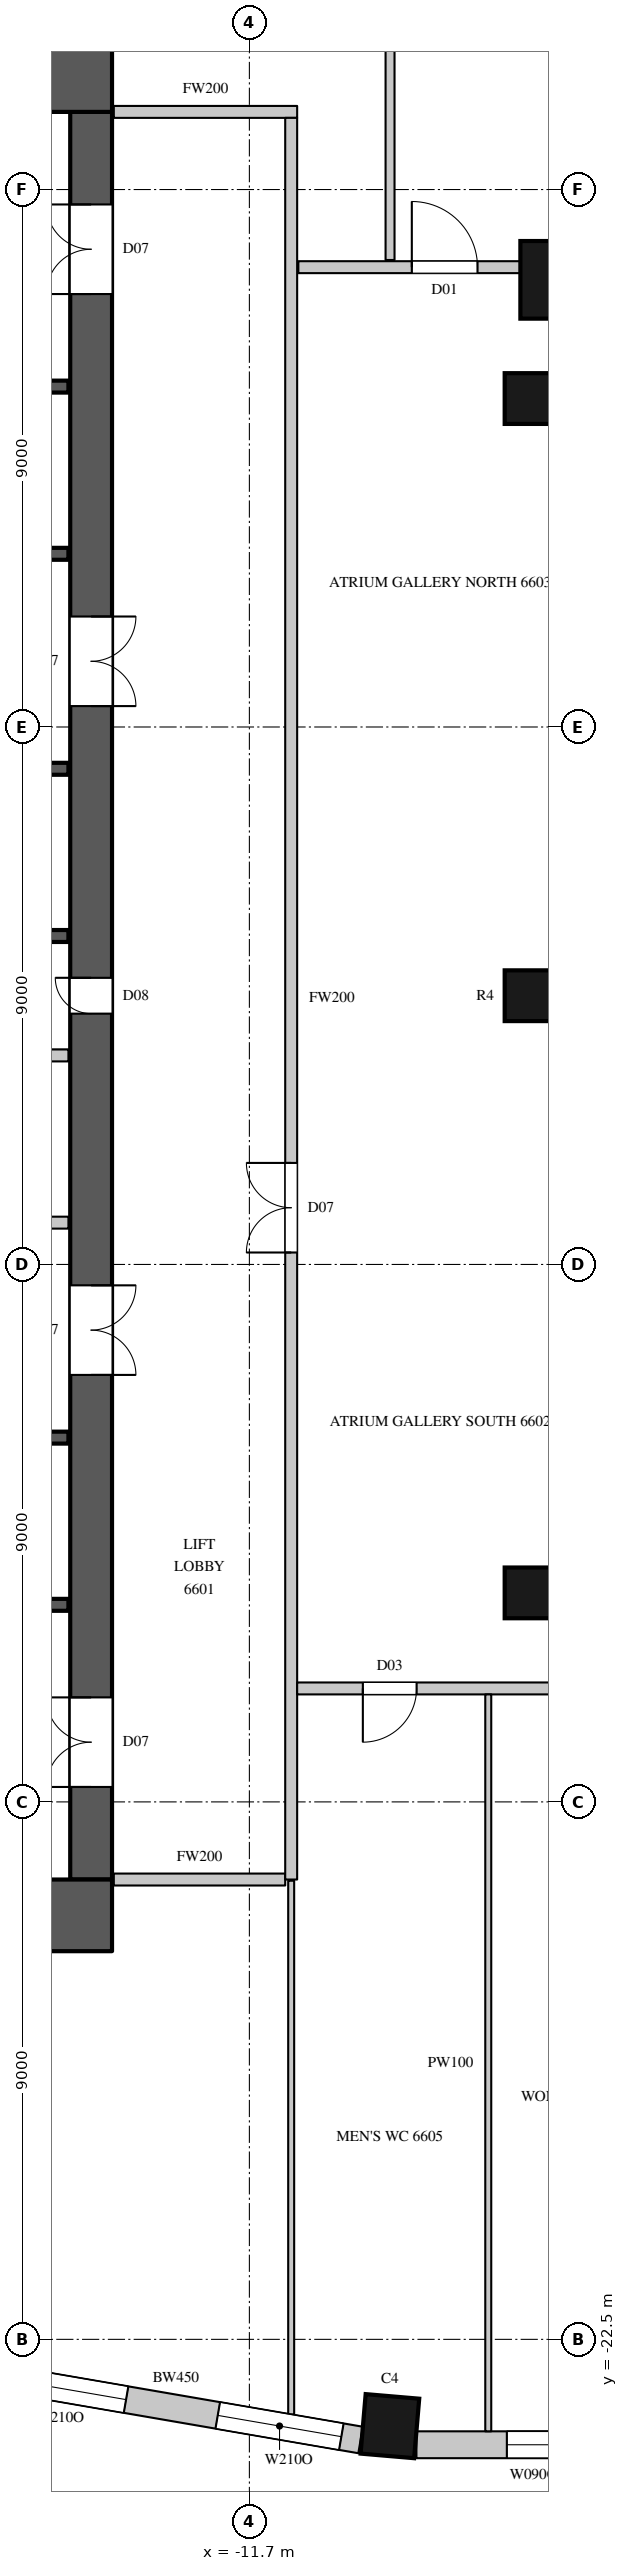
"""IFC4 building model, lengths in metres.
Left out: names, types, materials, properties, quantities, classifications, styles, units other than length and angle.
Written with IfcOpenShell. Run it as: python <this file> out.ifc"""

import sys

from ifc_helpers import new_model, si_unit, direction, frame, frame_2d, origin, origin_2d, place, context, subcontext, project, spatial, rectangle, circle, extrude, element, fill, save


model = new_model("IFC4")
c1 = context("Model", 3, precision=1e-05, world=origin(), true_north=direction((0.0, 1.0)))
c2 = subcontext(c1, "Body", "Model", "MODEL_VIEW")
j1 = project(units=[si_unit("LENGTHUNIT", "METRE"), si_unit("PLANEANGLEUNIT", "RADIAN")], contexts=[c1])
p1 = place(None, origin())
s1 = spatial("IfcSite", under=j1, at=p1, CompositionType="ELEMENT")
p2 = place(p1, origin())
s2 = spatial("IfcBuilding", under=s1, at=p2, CompositionType="ELEMENT")
p3 = place(p2, frame((0.0, 0.0, 292.6)))
s3 = spatial("IfcBuildingStorey", under=s2, at=p3, CompositionType="ELEMENT", Elevation=292.6)
p4 = place(p3, frame((-6.512, 11.988, 0.0), z_axis=(0.0, 0.0, 1.0), x_axis=(1.0, 0.0, 0.0)))
e1 = element("IfcColumn", 1, at=p4, inside=s3, PredefinedType="COLUMN", context=c2, shape_type="SweptSolid", body=[
    extrude(circle(Radius=0.65, at=origin_2d()), origin(), (0.0, 0.0, 1.0), 4.1),
])
p5 = place(p3, frame((-9.347, -23.954, 0.0), z_axis=(0.0, 0.0, 1.0), x_axis=(0.996368206733, -0.085149260784, 0.0)))
e2 = element("IfcColumn", 2, at=p5, inside=s3, PredefinedType="COLUMN", context=c2, shape_type="SweptSolid", body=[
    extrude(rectangle(XDim=0.9, YDim=1.0, at=origin_2d()), origin(), (0.0, 0.0, 1.0), 4.1),
])
for number, where, z_axis, x_axis in (
    (3, (-7.0, -10.0, 0.0), (0.0, 0.0, 1.0), (1.0, 0.0, 0.0)),
    (4, (-7.0, 0.0, 0.0), (0.0, 0.0, 1.0), (1.0, 0.0, 0.0)),
    (5, (-7.0, 10.0, 0.0), (0.0, 0.0, 1.0), (1.0, 0.0, 0.0)),
):
    element("IfcColumn", number, at=place(p3, frame(where, z_axis=z_axis, x_axis=x_axis)), inside=s3, PredefinedType="COLUMN", context=c2, shape_type="SweptSolid", body=[
        extrude(circle(Radius=0.425, at=origin_2d()), origin(), (0.0, 0.0, 1.0), 4.1),
    ])
p6 = place(p3, frame((-16.157, -23.097, 0.0), z_axis=(0.0, 0.0, 1.0), x_axis=(0.985502073964, -0.169663379113, 0.0)))
e6 = element("IfcWall", 6, at=p6, inside=s3, PredefinedType="SOLIDWALL", context=c2, shape_type="SweptSolid", body=[
    extrude(rectangle(XDim=6.412, YDim=0.45, at=frame_2d((3.206, 0.0))), origin(), (0.0, 0.0, 1.0), 3.8),
])
p7 = place(p6, frame((0.327, 0.0, 1.05)))
e7 = element("IfcOpeningElement", 7, at=p7, cuts=e6, PredefinedType="OPENING", context=c2, shape_type="SweptSolid", body=[
    extrude(rectangle(XDim=2.1, YDim=2.4, at=frame_2d((1.05, 1.2))), frame((0.0, 0.235, 0.0), z_axis=(0.0, -1.0, 0.0), x_axis=(1.0, 0.0, 0.0)), (0.0, 0.0, 1.0), 0.47),
])
p8 = place(p6, frame((3.985, 0.0, 1.05)))
e8 = element("IfcOpeningElement", 8, at=p8, cuts=e6, PredefinedType="OPENING", context=c2, shape_type="SweptSolid", body=[
    extrude(rectangle(XDim=2.1, YDim=2.4, at=frame_2d((1.05, 1.2))), frame((0.0, 0.235, 0.0), z_axis=(0.0, -1.0, 0.0), x_axis=(1.0, 0.0, 0.0)), (0.0, 0.0, 1.0), 0.47),
])
p9 = place(p3, frame((-8.903, -24.265, 0.0), z_axis=(0.0, 0.0, 1.0), x_axis=(1.0, 0.0, 0.0)))
e9 = element("IfcWall", 9, at=p9, inside=s3, PredefinedType="SOLIDWALL", context=c2, shape_type="SweptSolid", body=[
    extrude(rectangle(XDim=6.406, YDim=0.45, at=frame_2d((3.203, 0.0))), origin(), (0.0, 0.0, 1.0), 3.8),
])
p10 = place(p9, frame((1.514, 0.0, 1.05)))
e10 = element("IfcOpeningElement", 10, at=p10, cuts=e9, PredefinedType="OPENING", context=c2, shape_type="SweptSolid", body=[
    extrude(rectangle(XDim=0.9, YDim=2.4, at=frame_2d((0.45, 1.2))), frame((0.0, 0.235, 0.0), z_axis=(0.0, -1.0, 0.0), x_axis=(1.0, 0.0, 0.0)), (0.0, 0.0, 1.0), 0.47),
])
p11 = place(p9, frame((4.841, 0.0, 1.05)))
e11 = element("IfcOpeningElement", 11, at=p11, cuts=e9, PredefinedType="OPENING", context=c2, shape_type="SweptSolid", body=[
    extrude(rectangle(XDim=1.2, YDim=2.4, at=frame_2d((0.6, 1.2))), frame((0.0, 0.235, 0.0), z_axis=(0.0, -1.0, 0.0), x_axis=(1.0, 0.0, 0.0)), (0.0, 0.0, 1.0), 0.47),
])
for number, where, z_axis, x_axis in (
    (12, (-30.0, 15.4, 0.0), (0.0, 0.0, 1.0), (1.0, 0.0, 0.0)),
    (13, (-30.0, -15.4, 0.0), (0.0, 0.0, 1.0), (1.0, 0.0, 0.0)),
):
    element("IfcWall", number, at=place(p3, frame(where, z_axis=z_axis, x_axis=x_axis)), inside=s3, PredefinedType="SHEAR", context=c2, shape_type="SweptSolid", body=[
        extrude(rectangle(XDim=16.0, YDim=1.2, at=frame_2d((8.0, 0.0))), origin(), (0.0, 0.0, 1.0), 4.1),
    ])
p12 = place(p3, frame((-14.35, -14.8, 0.0), z_axis=(0.0, 0.0, 1.0), x_axis=(0.0, 1.0, 0.0)))
e14 = element("IfcWall", 14, at=p12, inside=s3, PredefinedType="SHEAR", context=c2, shape_type="SweptSolid", body=[
    extrude(rectangle(XDim=29.6, YDim=0.7, at=frame_2d((14.8, 0.0))), origin(), (0.0, 0.0, 1.0), 4.1),
])
p13 = place(p12, frame((1.55, 0.0, 0.0)))
e15 = element("IfcOpeningElement", 15, at=p13, cuts=e14, PredefinedType="OPENING", context=c2, shape_type="SweptSolid", body=[
    extrude(rectangle(XDim=1.5, YDim=2.4, at=frame_2d((0.75, 1.2))), frame((0.0, 0.36, 0.0), z_axis=(0.0, -1.0, 0.0), x_axis=(1.0, 0.0, 0.0)), (0.0, 0.0, 1.0), 0.72),
])
p14 = place(p12, frame((26.55, 0.0, 0.0)))
e16 = element("IfcOpeningElement", 16, at=p14, cuts=e14, PredefinedType="OPENING", context=c2, shape_type="SweptSolid", body=[
    extrude(rectangle(XDim=1.5, YDim=2.4, at=frame_2d((0.75, 1.2))), frame((0.0, 0.36, 0.0), z_axis=(0.0, -1.0, 0.0), x_axis=(1.0, 0.0, 0.0)), (0.0, 0.0, 1.0), 0.72),
])
p15 = place(p12, frame((8.45, 0.0, 0.0)))
e17 = element("IfcOpeningElement", 17, at=p15, cuts=e14, PredefinedType="OPENING", context=c2, shape_type="SweptSolid", body=[
    extrude(rectangle(XDim=1.5, YDim=2.4, at=frame_2d((0.75, 1.2))), frame((0.0, 0.36, 0.0), z_axis=(0.0, -1.0, 0.0), x_axis=(1.0, 0.0, 0.0)), (0.0, 0.0, 1.0), 0.72),
])
p16 = place(p12, frame((19.65, 0.0, 0.0)))
e18 = element("IfcOpeningElement", 18, at=p16, cuts=e14, PredefinedType="OPENING", context=c2, shape_type="SweptSolid", body=[
    extrude(rectangle(XDim=1.5, YDim=2.4, at=frame_2d((0.75, 1.2))), frame((0.0, 0.36, 0.0), z_axis=(0.0, -1.0, 0.0), x_axis=(1.0, 0.0, 0.0)), (0.0, 0.0, 1.0), 0.72),
])
p17 = place(p12, frame((14.5, 0.0, 0.0)))
e19 = element("IfcOpeningElement", 19, at=p17, cuts=e14, PredefinedType="OPENING", context=c2, shape_type="SweptSolid", body=[
    extrude(rectangle(XDim=0.6, YDim=2.0, at=frame_2d((0.3, 1.0))), frame((0.0, 0.36, 0.0), z_axis=(0.0, -1.0, 0.0), x_axis=(1.0, 0.0, 0.0)), (0.0, 0.0, 1.0), 0.72),
])
p18 = place(p3, frame((-29.27, -3.8, 0.0), z_axis=(0.0, 0.0, 1.0), x_axis=(1.0, 0.0, 0.0)))
e20 = element("IfcWall", 20, at=p18, inside=s3, PredefinedType="PARTITIONING", context=c2, shape_type="SweptSolid", body=[
    extrude(rectangle(XDim=14.54, YDim=0.2, at=frame_2d((7.27, 0.0))), origin(), (0.0, 0.0, 1.0), 3.8),
])
p19 = place(p18, frame((3.25, 0.0, 0.0)))
e21 = element("IfcOpeningElement", 21, at=p19, cuts=e20, PredefinedType="OPENING", context=c2, shape_type="SweptSolid", body=[
    extrude(rectangle(XDim=0.9, YDim=2.2, at=frame_2d((0.45, 1.1))), frame((0.0, 0.11, 0.0), z_axis=(0.0, -1.0, 0.0), x_axis=(1.0, 0.0, 0.0)), (0.0, 0.0, 1.0), 0.22),
])
p20 = place(p18, frame((10.35, 0.0, 0.0)))
e22 = element("IfcOpeningElement", 22, at=p20, cuts=e20, PredefinedType="OPENING", context=c2, shape_type="SweptSolid", body=[
    extrude(rectangle(XDim=0.9, YDim=2.2, at=frame_2d((0.45, 1.1))), frame((0.0, 0.11, 0.0), z_axis=(0.0, -1.0, 0.0), x_axis=(1.0, 0.0, 0.0)), (0.0, 0.0, 1.0), 0.22),
])
p21 = place(p3, frame((-13.97, -14.8, 0.0), z_axis=(0.0, 0.0, 1.0), x_axis=(1.0, 0.0, 0.0)))
e23 = element("IfcWall", 23, at=p21, inside=s3, PredefinedType="PARTITIONING", context=c2, shape_type="SweptSolid", body=[
    extrude(rectangle(XDim=2.87, YDim=0.2, at=frame_2d((1.435, 0.0))), origin(), (0.0, 0.0, 1.0), 3.8),
])
p22 = place(p3, frame((-13.97, 14.8, 0.0), z_axis=(0.0, 0.0, 1.0), x_axis=(1.0, 0.0, 0.0)))
e24 = element("IfcWall", 24, at=p22, inside=s3, PredefinedType="PARTITIONING", context=c2, shape_type="SweptSolid", body=[
    extrude(rectangle(XDim=3.07, YDim=0.2, at=frame_2d((1.535, 0.0))), origin(), (0.0, 0.0, 1.0), 3.8),
])
p23 = place(p3, frame((-11.0, -14.8, 0.0), z_axis=(0.0, 0.0, 1.0), x_axis=(0.0, 1.0, 0.0)))
e25 = element("IfcWall", 25, at=p23, inside=s3, PredefinedType="PARTITIONING", context=c2, shape_type="SweptSolid", body=[
    extrude(rectangle(XDim=29.5, YDim=0.2, at=frame_2d((14.75, 0.0))), origin(), (0.0, 0.0, 1.0), 3.8),
])
p24 = place(p23, frame((10.5, 0.0, 0.0)))
e26 = element("IfcOpeningElement", 26, at=p24, cuts=e25, PredefinedType="OPENING", context=c2, shape_type="SweptSolid", body=[
    extrude(rectangle(XDim=1.5, YDim=2.4, at=frame_2d((0.75, 1.2))), frame((0.0, 0.11, 0.0), z_axis=(0.0, -1.0, 0.0), x_axis=(1.0, 0.0, 0.0)), (0.0, 0.0, 1.0), 0.22),
])
p25 = place(p3, frame((-10.9, -11.6, 0.0), z_axis=(0.0, 0.0, 1.0), x_axis=(1.0, 0.0, 0.0)))
e27 = element("IfcWall", 27, at=p25, inside=s3, PredefinedType="PARTITIONING", context=c2, shape_type="SweptSolid", body=[
    extrude(rectangle(XDim=13.421, YDim=0.2, at=frame_2d((6.71, 0.0))), origin(), (0.0, 0.0, 1.0), 3.8),
])
p26 = place(p25, frame((1.1, 0.0, 0.0)))
e28 = element("IfcOpeningElement", 28, at=p26, cuts=e27, PredefinedType="OPENING", context=c2, shape_type="SweptSolid", body=[
    extrude(rectangle(XDim=0.9, YDim=2.2, at=frame_2d((0.45, 1.1))), frame((0.0, 0.11, 0.0), z_axis=(0.0, -1.0, 0.0), x_axis=(1.0, 0.0, 0.0)), (0.0, 0.0, 1.0), 0.22),
])
p27 = place(p25, frame((4.9, 0.0, 0.0)))
e29 = element("IfcOpeningElement", 29, at=p27, cuts=e27, PredefinedType="OPENING", context=c2, shape_type="SweptSolid", body=[
    extrude(rectangle(XDim=0.9, YDim=2.2, at=frame_2d((0.45, 1.1))), frame((0.0, 0.11, 0.0), z_axis=(0.0, -1.0, 0.0), x_axis=(1.0, 0.0, 0.0)), (0.0, 0.0, 1.0), 0.22),
])
p28 = place(p25, frame((7.25, 0.0, 0.0)))
e30 = element("IfcOpeningElement", 30, at=p28, cuts=e27, PredefinedType="OPENING", context=c2, shape_type="SweptSolid", body=[
    extrude(rectangle(XDim=0.9, YDim=2.2, at=frame_2d((0.45, 1.1))), frame((0.0, 0.11, 0.0), z_axis=(0.0, -1.0, 0.0), x_axis=(1.0, 0.0, 0.0)), (0.0, 0.0, 1.0), 0.22),
])
p29 = place(p25, frame((9.9, 0.0, 0.0)))
e31 = element("IfcOpeningElement", 31, at=p29, cuts=e27, PredefinedType="OPENING", context=c2, shape_type="SweptSolid", body=[
    extrude(rectangle(XDim=1.1, YDim=2.4, at=frame_2d((0.55, 1.2))), frame((0.0, 0.11, 0.0), z_axis=(0.0, -1.0, 0.0), x_axis=(1.0, 0.0, 0.0)), (0.0, 0.0, 1.0), 0.22),
])
p30 = place(p3, frame((-10.88, 12.2, 0.0), z_axis=(0.0, 0.0, 1.0), x_axis=(1.0, 0.0, 0.0)))
e32 = element("IfcWall", 32, at=p30, inside=s3, PredefinedType="PARTITIONING", context=c2, shape_type="SweptSolid", body=[
    extrude(rectangle(XDim=3.736, YDim=0.2, at=frame_2d((1.868, 0.0))), origin(), (0.0, 0.0, 1.0), 3.8),
])
p31 = place(p30, frame((1.9, 0.0, 0.0)))
e33 = element("IfcOpeningElement", 33, at=p31, cuts=e32, PredefinedType="OPENING", context=c2, shape_type="SweptSolid", body=[
    extrude(rectangle(XDim=1.1, YDim=2.4, at=frame_2d((0.55, 1.2))), frame((0.0, 0.11, 0.0), z_axis=(0.0, -1.0, 0.0), x_axis=(1.0, 0.0, 0.0)), (0.0, 0.0, 1.0), 0.22),
])
p32 = place(p3, frame((-9.344, 12.32, 0.0), z_axis=(0.0, 0.0, 1.0), x_axis=(0.0, 1.0, 0.0)))
e34 = element("IfcWall", 34, at=p32, inside=s3, PredefinedType="PARTITIONING", context=c2, shape_type="SweptSolid", body=[
    extrude(rectangle(XDim=12.675, YDim=0.15, at=frame_2d((6.338, 0.0))), origin(), (0.0, 0.0, 1.0), 3.8),
])
p33 = place(p3, frame((-29.27, -1.0, 0.0), z_axis=(0.0, 0.0, 1.0), x_axis=(1.0, 0.0, 0.0)))
e35 = element("IfcWall", 35, at=p33, inside=s3, PredefinedType="PARTITIONING", context=c2, shape_type="SweptSolid", body=[
    extrude(rectangle(XDim=14.54, YDim=0.2, at=frame_2d((7.27, 0.0))), origin(), (0.0, 0.0, 1.0), 3.8),
])
p34 = place(p3, frame((-17.92, -10.2, 0.0), z_axis=(0.0, 0.0, 1.0), x_axis=(1.0, 0.0, 0.0)))
e36 = element("IfcWall", 36, at=p34, inside=s3, PredefinedType="SHEAR", context=c2, shape_type="SweptSolid", body=[
    extrude(rectangle(XDim=3.19, YDim=0.2, at=frame_2d((1.595, 0.0))), origin(), (0.0, 0.0, 1.0), 3.8),
])
p35 = place(p34, frame((1.05, 0.0, 0.0)))
e37 = element("IfcOpeningElement", 37, at=p35, cuts=e36, PredefinedType="OPENING", context=c2, shape_type="SweptSolid", body=[
    extrude(rectangle(XDim=1.1, YDim=2.2, at=frame_2d((0.55, 1.1))), frame((0.0, 0.11, 0.0), z_axis=(0.0, -1.0, 0.0), x_axis=(1.0, 0.0, 0.0)), (0.0, 0.0, 1.0), 0.22),
])
p36 = place(p3, frame((-17.92, -7.4, 0.0), z_axis=(0.0, 0.0, 1.0), x_axis=(1.0, 0.0, 0.0)))
e38 = element("IfcWall", 38, at=p36, inside=s3, PredefinedType="SHEAR", context=c2, shape_type="SweptSolid", body=[
    extrude(rectangle(XDim=3.19, YDim=0.2, at=frame_2d((1.595, 0.0))), origin(), (0.0, 0.0, 1.0), 3.8),
])
p37 = place(p3, frame((-17.9, 1.0, 0.0), z_axis=(0.0, 0.0, 1.0), x_axis=(1.0, 0.0, 0.0)))
e39 = element("IfcWall", 39, at=p37, inside=s3, PredefinedType="SHEAR", context=c2, shape_type="SweptSolid", body=[
    extrude(rectangle(XDim=3.17, YDim=0.2, at=frame_2d((1.585, 0.0))), origin(), (0.0, 0.0, 1.0), 3.8),
])
p38 = place(p3, frame((-17.9, 3.8, 0.0), z_axis=(0.0, 0.0, 1.0), x_axis=(1.0, 0.0, 0.0)))
e40 = element("IfcWall", 40, at=p38, inside=s3, PredefinedType="SHEAR", context=c2, shape_type="SweptSolid", body=[
    extrude(rectangle(XDim=3.17, YDim=0.2, at=frame_2d((1.585, 0.0))), origin(), (0.0, 0.0, 1.0), 3.8),
])
p39 = place(p38, frame((1.05, 0.0, 0.0)))
e41 = element("IfcOpeningElement", 41, at=p39, cuts=e40, PredefinedType="OPENING", context=c2, shape_type="SweptSolid", body=[
    extrude(rectangle(XDim=1.1, YDim=2.2, at=frame_2d((0.55, 1.1))), frame((0.0, 0.11, 0.0), z_axis=(0.0, -1.0, 0.0), x_axis=(1.0, 0.0, 0.0)), (0.0, 0.0, 1.0), 0.22),
])
p40 = place(p3, frame((-17.92, 7.4, 0.0), z_axis=(0.0, 0.0, 1.0), x_axis=(1.0, 0.0, 0.0)))
e42 = element("IfcWall", 42, at=p40, inside=s3, PredefinedType="SHEAR", context=c2, shape_type="SweptSolid", body=[
    extrude(rectangle(XDim=3.19, YDim=0.2, at=frame_2d((1.595, 0.0))), origin(), (0.0, 0.0, 1.0), 3.8),
])
p41 = place(p3, frame((-17.92, 10.2, 0.0), z_axis=(0.0, 0.0, 1.0), x_axis=(1.0, 0.0, 0.0)))
e43 = element("IfcWall", 43, at=p41, inside=s3, PredefinedType="SHEAR", context=c2, shape_type="SweptSolid", body=[
    extrude(rectangle(XDim=3.19, YDim=0.2, at=frame_2d((1.595, 0.0))), origin(), (0.0, 0.0, 1.0), 3.8),
])
p42 = place(p41, frame((1.05, 0.0, 0.0)))
e44 = element("IfcOpeningElement", 44, at=p42, cuts=e43, PredefinedType="OPENING", context=c2, shape_type="SweptSolid", body=[
    extrude(rectangle(XDim=1.1, YDim=2.2, at=frame_2d((0.55, 1.1))), frame((0.0, 0.11, 0.0), z_axis=(0.0, -1.0, 0.0), x_axis=(1.0, 0.0, 0.0)), (0.0, 0.0, 1.0), 0.22),
])
p43 = place(p3, frame((-11.0, -23.757, 0.0), z_axis=(0.0, 0.0, 1.0), x_axis=(0.0, 1.0, 0.0)))
e45 = element("IfcWall", 45, at=p43, inside=s3, PredefinedType="PARTITIONING", context=c2, shape_type="SweptSolid", body=[
    extrude(rectangle(XDim=8.937, YDim=0.1, at=frame_2d((4.468, 0.0))), origin(), (0.0, 0.0, 1.0), 3.8),
])
p44 = place(p3, frame((-7.7, -24.04, 0.0), z_axis=(0.0, 0.0, 1.0), x_axis=(0.0, 1.0, 0.0)))
e46 = element("IfcWall", 46, at=p44, inside=s3, PredefinedType="PARTITIONING", context=c2, shape_type="SweptSolid", body=[
    extrude(rectangle(XDim=12.34, YDim=0.1, at=frame_2d((6.17, 0.0))), origin(), (0.0, 0.0, 1.0), 3.8),
])
p45 = place(p7, origin())
e47 = element("IfcWindow", 47, at=p45, inside=s3, PartitioningType="SINGLE_PANEL", PredefinedType="WINDOW", context=c2, shape_type="SweptSolid", body=[
    extrude(rectangle(XDim=2.1, YDim=2.4, at=frame_2d((1.05, 1.2))), frame((0.0, 0.135, 0.0), z_axis=(0.0, -1.0, 0.0), x_axis=(1.0, 0.0, 0.0)), (0.0, 0.0, 1.0), 0.06),
])
fill(e7, e47)
p46 = place(p8, origin())
e48 = element("IfcWindow", 48, at=p46, inside=s3, PartitioningType="SINGLE_PANEL", PredefinedType="WINDOW", context=c2, shape_type="SweptSolid", body=[
    extrude(rectangle(XDim=2.1, YDim=2.4, at=frame_2d((1.05, 1.2))), frame((0.0, 0.135, 0.0), z_axis=(0.0, -1.0, 0.0), x_axis=(1.0, 0.0, 0.0)), (0.0, 0.0, 1.0), 0.06),
])
fill(e8, e48)
p47 = place(p24, origin())
e49 = element("IfcDoor", 49, at=p47, inside=s3, OperationType="DOUBLE_DOOR_SINGLE_SWING", PredefinedType="DOOR", context=c2, shape_type="SweptSolid", body=[
    extrude(rectangle(XDim=1.5, YDim=2.4, at=frame_2d((0.75, 1.2))), frame((0.0, 0.025, 0.0), z_axis=(0.0, -1.0, 0.0), x_axis=(1.0, 0.0, 0.0)), (0.0, 0.0, 1.0), 0.05),
])
fill(e26, e49)
p48 = place(p26, origin())
e50 = element("IfcDoor", 50, at=p48, inside=s3, OperationType="SINGLE_SWING_RIGHT", PredefinedType="DOOR", context=c2, shape_type="SweptSolid", body=[
    extrude(rectangle(XDim=0.9, YDim=2.2, at=frame_2d((0.45, 1.1))), frame((0.0, 0.025, 0.0), z_axis=(0.0, -1.0, 0.0), x_axis=(1.0, 0.0, 0.0)), (0.0, 0.0, 1.0), 0.05),
])
fill(e28, e50)
p49 = place(p31, origin())
e51 = element("IfcDoor", 51, at=p49, inside=s3, OperationType="SINGLE_SWING_LEFT", PredefinedType="DOOR", context=c2, shape_type="SweptSolid", body=[
    extrude(rectangle(XDim=1.1, YDim=2.4, at=frame_2d((0.55, 1.2))), frame((0.0, 0.025, 0.0), z_axis=(0.0, -1.0, 0.0), x_axis=(1.0, 0.0, 0.0)), (0.0, 0.0, 1.0), 0.05),
])
fill(e33, e51)
p50 = place(p13, origin())
e52 = element("IfcDoor", 52, at=p50, inside=s3, OperationType="DOUBLE_DOOR_SINGLE_SWING", PredefinedType="DOOR", context=c2, shape_type="SweptSolid", body=[
    extrude(rectangle(XDim=1.5, YDim=2.4, at=frame_2d((0.75, 1.2))), frame((0.0, 0.345, 0.0), z_axis=(0.0, -1.0, 0.0), x_axis=(1.0, 0.0, 0.0)), (0.0, 0.0, 1.0), 0.05),
])
fill(e15, e52)
p51 = place(p14, origin())
e53 = element("IfcDoor", 53, at=p51, inside=s3, OperationType="DOUBLE_DOOR_SINGLE_SWING", PredefinedType="DOOR", context=c2, shape_type="SweptSolid", body=[
    extrude(rectangle(XDim=1.5, YDim=2.4, at=frame_2d((0.75, 1.2))), frame((0.0, 0.345, 0.0), z_axis=(0.0, -1.0, 0.0), x_axis=(1.0, 0.0, 0.0)), (0.0, 0.0, 1.0), 0.05),
])
fill(e16, e53)
p52 = place(p15, origin())
e54 = element("IfcDoor", 54, at=p52, inside=s3, OperationType="DOUBLE_DOOR_SINGLE_SWING", PredefinedType="DOOR", context=c2, shape_type="SweptSolid", body=[
    extrude(rectangle(XDim=1.5, YDim=2.4, at=frame_2d((0.75, 1.2))), frame((0.0, -0.295, 0.0), z_axis=(0.0, -1.0, 0.0), x_axis=(1.0, 0.0, 0.0)), (0.0, 0.0, 1.0), 0.05),
])
fill(e17, e54)
p53 = place(p16, origin())
e55 = element("IfcDoor", 55, at=p53, inside=s3, OperationType="DOUBLE_DOOR_SINGLE_SWING", PredefinedType="DOOR", context=c2, shape_type="SweptSolid", body=[
    extrude(rectangle(XDim=1.5, YDim=2.4, at=frame_2d((0.75, 1.2))), frame((0.0, -0.295, 0.0), z_axis=(0.0, -1.0, 0.0), x_axis=(1.0, 0.0, 0.0)), (0.0, 0.0, 1.0), 0.05),
])
fill(e18, e55)
p54 = place(p17, origin())
e56 = element("IfcDoor", 56, at=p54, inside=s3, OperationType="SINGLE_SWING_RIGHT", PredefinedType="DOOR", context=c2, shape_type="SweptSolid", body=[
    extrude(rectangle(XDim=0.6, YDim=2.0, at=frame_2d((0.3, 1.0))), frame((0.0, 0.345, 0.0), z_axis=(0.0, -1.0, 0.0), x_axis=(1.0, 0.0, 0.0)), (0.0, 0.0, 1.0), 0.05),
])
fill(e19, e56)
p55 = place(p10, origin())
e57 = element("IfcWindow", 57, at=p55, inside=s3, PartitioningType="SINGLE_PANEL", PredefinedType="WINDOW", context=c2, shape_type="SweptSolid", body=[
    extrude(rectangle(XDim=0.9, YDim=2.4, at=frame_2d((0.45, 1.2))), frame((0.0, 0.135, 0.0), z_axis=(0.0, -1.0, 0.0), x_axis=(1.0, 0.0, 0.0)), (0.0, 0.0, 1.0), 0.06),
])
fill(e10, e57)
save(model, sys.argv[1])
